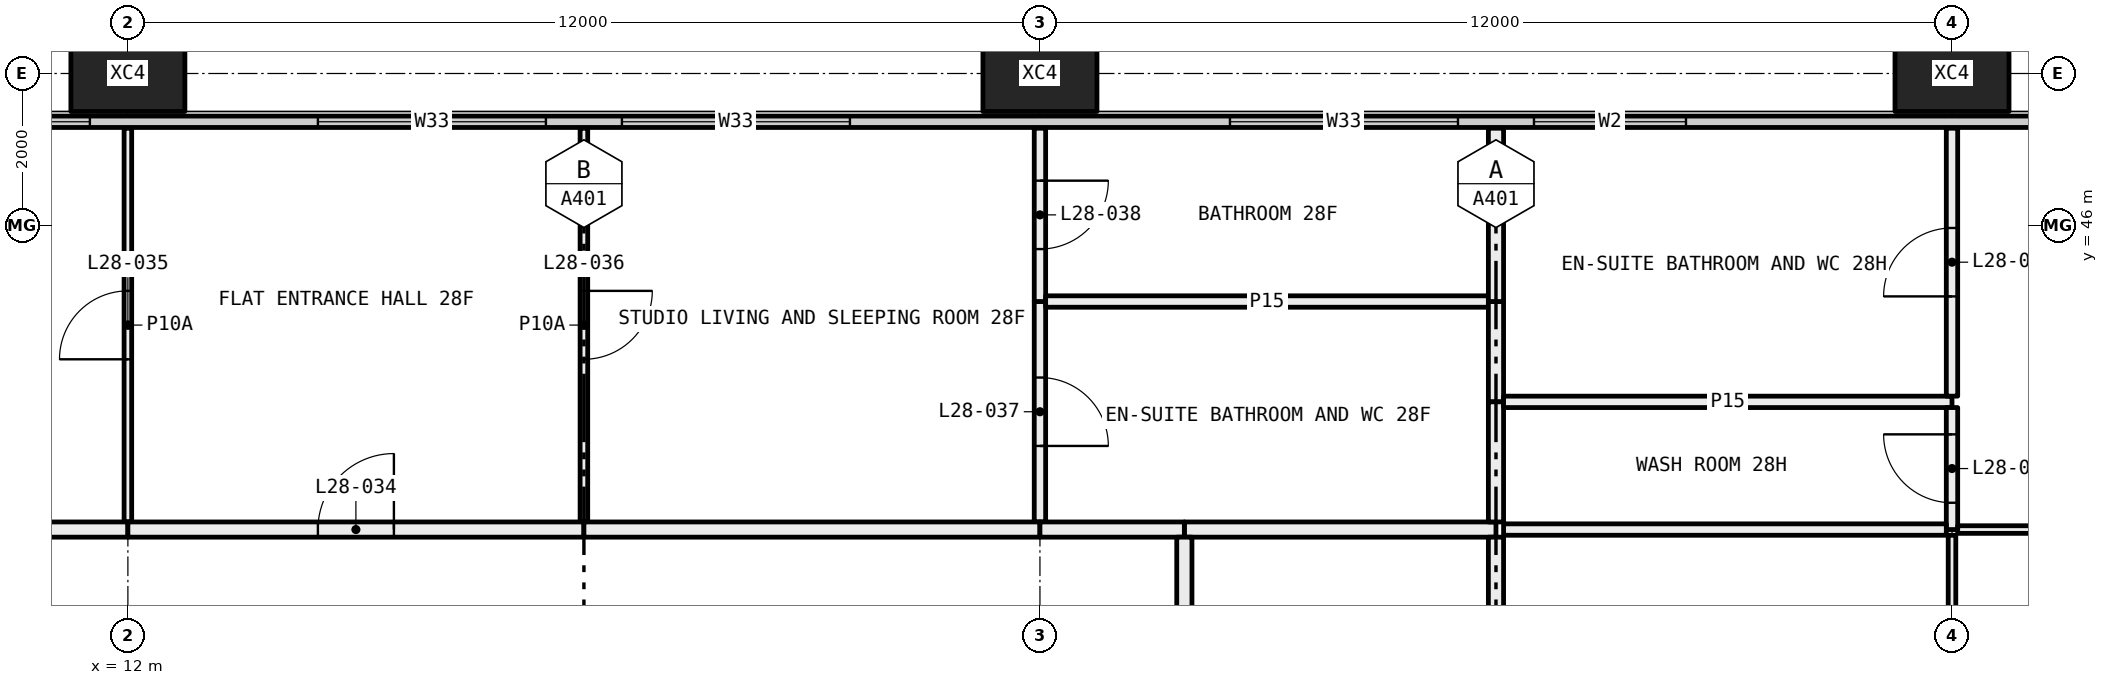
"""IFC4 building model, lengths in metres.
Left out: names, types, materials, properties, quantities, classifications, styles, units other than length and angle.
Written with IfcOpenShell. Run it as: python <this file> out.ifc"""

import sys

from ifc_helpers import new_model, si_unit, direction, frame, frame_2d, origin, origin_2d, place, context, subcontext, project, spatial, rectangle, hollow_rectangle, extrude, element, fill, save


model = new_model("IFC4")
c1 = context("Model", 3, precision=1e-05, world=origin(), true_north=direction((0.0, 1.0)))
c2 = subcontext(c1, "Body", "Model", "MODEL_VIEW")
j1 = project(units=[si_unit("LENGTHUNIT", "METRE"), si_unit("PLANEANGLEUNIT", "RADIAN")], contexts=[c1])
p1 = place(None, origin())
s1 = spatial("IfcSite", under=j1, at=p1, CompositionType="ELEMENT")
p2 = place(p1, origin())
s2 = spatial("IfcBuilding", under=s1, at=p2, CompositionType="ELEMENT")
p3 = place(p2, frame((0.0, 0.0, 110.4)))
s3 = spatial("IfcBuildingStorey", under=s2, at=p3, CompositionType="ELEMENT", Elevation=110.4)
for number, where, z_axis, x_axis in (
    (1, (12.0, 48.0, -0.4), (0.0, 0.0, 1.0), (1.0, 0.0, 0.0)),
    (2, (24.0, 48.0, -0.4), (0.0, 0.0, 1.0), (1.0, 0.0, 0.0)),
    (3, (36.0, 48.0, -0.4), (0.0, 0.0, 1.0), (1.0, 0.0, 0.0)),
):
    element("IfcColumn", number, at=place(p3, frame(where, z_axis=z_axis, x_axis=x_axis)), inside=s3, PredefinedType="COLUMN", context=c2, shape_type="SweptSolid", body=[
        extrude(hollow_rectangle(XDim=1.5, YDim=1.0, WallThickness=0.06, at=origin_2d()), origin(), (0.0, 0.0, 1.0), 3.45),
    ])
p4 = place(p3, frame((6.56, 47.365, 0.0), z_axis=(0.0, 0.0, 1.0), x_axis=(1.0, 0.0, 0.0)))
e4 = element("IfcWall", 4, at=p4, inside=s3, PredefinedType="ELEMENTEDWALL", context=c2, shape_type="SweptSolid", body=[
    extrude(rectangle(XDim=58.88, YDim=0.15, at=frame_2d((29.44, 0.0))), origin(), (0.0, 0.0, 1.0), 3.05),
])
p5 = place(p4, frame((0.44, 0.0, 0.45)))
e5 = element("IfcOpeningElement", 5, at=p5, cuts=e4, PredefinedType="OPENING", context=c2, shape_type="SweptSolid", body=[
    extrude(rectangle(XDim=4.5, YDim=2.55, at=frame_2d((2.25, 1.275))), frame((0.0, 0.085, 0.0), z_axis=(0.0, -1.0, 0.0), x_axis=(1.0, 0.0, 0.0)), (0.0, 0.0, 1.0), 0.17),
])
p6 = place(p4, frame((7.94, 0.0, 0.45)))
e6 = element("IfcOpeningElement", 6, at=p6, cuts=e4, PredefinedType="OPENING", context=c2, shape_type="SweptSolid", body=[
    extrude(rectangle(XDim=3.0, YDim=2.55, at=frame_2d((1.5, 1.275))), frame((0.0, 0.085, 0.0), z_axis=(0.0, -1.0, 0.0), x_axis=(1.0, 0.0, 0.0)), (0.0, 0.0, 1.0), 0.17),
])
p7 = place(p4, frame((11.94, 0.0, 0.45)))
e7 = element("IfcOpeningElement", 7, at=p7, cuts=e4, PredefinedType="OPENING", context=c2, shape_type="SweptSolid", body=[
    extrude(rectangle(XDim=3.0, YDim=2.55, at=frame_2d((1.5, 1.275))), frame((0.0, 0.085, 0.0), z_axis=(0.0, -1.0, 0.0), x_axis=(1.0, 0.0, 0.0)), (0.0, 0.0, 1.0), 0.17),
])
p8 = place(p4, frame((19.94, 0.0, 0.45)))
e8 = element("IfcOpeningElement", 8, at=p8, cuts=e4, PredefinedType="OPENING", context=c2, shape_type="SweptSolid", body=[
    extrude(rectangle(XDim=3.0, YDim=2.55, at=frame_2d((1.5, 1.275))), frame((0.0, 0.085, 0.0), z_axis=(0.0, -1.0, 0.0), x_axis=(1.0, 0.0, 0.0)), (0.0, 0.0, 1.0), 0.17),
])
p9 = place(p4, frame((23.94, 0.0, 0.45)))
e9 = element("IfcOpeningElement", 9, at=p9, cuts=e4, PredefinedType="OPENING", context=c2, shape_type="SweptSolid", body=[
    extrude(rectangle(XDim=2.0, YDim=2.55, at=frame_2d((1.0, 1.275))), frame((0.0, 0.085, 0.0), z_axis=(0.0, -1.0, 0.0), x_axis=(1.0, 0.0, 0.0)), (0.0, 0.0, 1.0), 0.17),
])
p10 = place(p4, frame((31.94, 0.0, 0.45)))
e10 = element("IfcOpeningElement", 10, at=p10, cuts=e4, PredefinedType="OPENING", context=c2, shape_type="SweptSolid", body=[
    extrude(rectangle(XDim=3.0, YDim=2.55, at=frame_2d((1.5, 1.275))), frame((0.0, 0.085, 0.0), z_axis=(0.0, -1.0, 0.0), x_axis=(1.0, 0.0, 0.0)), (0.0, 0.0, 1.0), 0.17),
])
p11 = place(p4, frame((35.94, 0.0, 0.45)))
e11 = element("IfcOpeningElement", 11, at=p11, cuts=e4, PredefinedType="OPENING", context=c2, shape_type="SweptSolid", body=[
    extrude(rectangle(XDim=3.0, YDim=2.55, at=frame_2d((1.5, 1.275))), frame((0.0, 0.085, 0.0), z_axis=(0.0, -1.0, 0.0), x_axis=(1.0, 0.0, 0.0)), (0.0, 0.0, 1.0), 0.17),
])
p12 = place(p4, frame((43.94, 0.0, 0.45)))
e12 = element("IfcOpeningElement", 12, at=p12, cuts=e4, PredefinedType="OPENING", context=c2, shape_type="SweptSolid", body=[
    extrude(rectangle(XDim=3.0, YDim=2.55, at=frame_2d((1.5, 1.275))), frame((0.0, 0.085, 0.0), z_axis=(0.0, -1.0, 0.0), x_axis=(1.0, 0.0, 0.0)), (0.0, 0.0, 1.0), 0.17),
])
p13 = place(p4, frame((47.94, 0.0, 0.45)))
e13 = element("IfcOpeningElement", 13, at=p13, cuts=e4, PredefinedType="OPENING", context=c2, shape_type="SweptSolid", body=[
    extrude(rectangle(XDim=2.0, YDim=2.55, at=frame_2d((1.0, 1.275))), frame((0.0, 0.085, 0.0), z_axis=(0.0, -1.0, 0.0), x_axis=(1.0, 0.0, 0.0)), (0.0, 0.0, 1.0), 0.17),
])
p14 = place(p4, frame((53.94, 0.0, 0.45)))
e14 = element("IfcOpeningElement", 14, at=p14, cuts=e4, PredefinedType="OPENING", context=c2, shape_type="SweptSolid", body=[
    extrude(rectangle(XDim=4.5, YDim=2.55, at=frame_2d((2.25, 1.275))), frame((0.0, 0.085, 0.0), z_axis=(0.0, -1.0, 0.0), x_axis=(1.0, 0.0, 0.0)), (0.0, 0.0, 1.0), 0.17),
])
p15 = place(p3, frame((12.0, 42.1, 0.0), z_axis=(0.0, 0.0, 1.0), x_axis=(0.0, 1.0, 0.0)))
e15 = element("IfcWall", 15, at=p15, inside=s3, PredefinedType="PARTITIONING", context=c2, shape_type="SweptSolid", body=[
    extrude(rectangle(XDim=5.18, YDim=0.1, at=frame_2d((2.59, 0.0))), origin(), (0.0, 0.0, 1.0), 3.05),
])
p16 = place(p15, frame((2.14, 0.0, 0.0)))
e16 = element("IfcOpeningElement", 16, at=p16, cuts=e15, PredefinedType="OPENING", context=c2, shape_type="SweptSolid", body=[
    extrude(rectangle(XDim=0.9, YDim=2.1, at=frame_2d((0.45, 1.05))), frame((0.0, 0.06, 0.0), z_axis=(0.0, -1.0, 0.0), x_axis=(1.0, 0.0, 0.0)), (0.0, 0.0, 1.0), 0.12),
])
p17 = place(p3, frame((10.2, 42.0, 0.0), z_axis=(0.0, 0.0, 1.0), x_axis=(1.0, 0.0, 0.0)))
e17 = element("IfcWall", 17, at=p17, inside=s3, PredefinedType="PARTITIONING", context=c2, shape_type="SweptSolid", body=[
    extrude(rectangle(XDim=1.8, YDim=0.2, at=frame_2d((0.9, 0.0))), origin(), (0.0, 0.0, 1.0), 3.05),
])
p18 = place(p3, frame((18.0, 42.1, 0.0), z_axis=(0.0, 0.0, 1.0), x_axis=(0.0, 1.0, 0.0)))
e18 = element("IfcWall", 18, at=p18, inside=s3, PredefinedType="PARTITIONING", context=c2, shape_type="SweptSolid", body=[
    extrude(rectangle(XDim=5.18, YDim=0.1, at=frame_2d((2.59, 0.0))), origin(), (0.0, 0.0, 1.0), 3.05),
])
p19 = place(p18, frame((2.14, 0.0, 0.0)))
e19 = element("IfcOpeningElement", 19, at=p19, cuts=e18, PredefinedType="OPENING", context=c2, shape_type="SweptSolid", body=[
    extrude(rectangle(XDim=0.9, YDim=2.1, at=frame_2d((0.45, 1.05))), frame((0.0, 0.06, 0.0), z_axis=(0.0, -1.0, 0.0), x_axis=(1.0, 0.0, 0.0)), (0.0, 0.0, 1.0), 0.12),
])
p20 = place(p3, frame((12.0, 42.0, 0.0), z_axis=(0.0, 0.0, 1.0), x_axis=(1.0, 0.0, 0.0)))
e20 = element("IfcWall", 20, at=p20, inside=s3, PredefinedType="PARTITIONING", context=c2, shape_type="SweptSolid", body=[
    extrude(rectangle(XDim=6.0, YDim=0.2, at=frame_2d((3.0, 0.0))), origin(), (0.0, 0.0, 1.0), 3.05),
])
p21 = place(p20, frame((2.5, 0.0, 0.0)))
e21 = element("IfcOpeningElement", 21, at=p21, cuts=e20, PredefinedType="OPENING", context=c2, shape_type="SweptSolid", body=[
    extrude(rectangle(XDim=1.0, YDim=2.1, at=frame_2d((0.5, 1.05))), frame((0.0, 0.11, 0.0), z_axis=(0.0, -1.0, 0.0), x_axis=(1.0, 0.0, 0.0)), (0.0, 0.0, 1.0), 0.22),
])
p22 = place(p3, frame((24.0, 42.1, 0.0), z_axis=(0.0, 0.0, 1.0), x_axis=(0.0, 1.0, 0.0)))
e22 = element("IfcWall", 22, at=p22, inside=s3, PredefinedType="PARTITIONING", context=c2, shape_type="SweptSolid", body=[
    extrude(rectangle(XDim=2.9, YDim=0.15, at=frame_2d((1.45, 0.0))), origin(), (0.0, 0.0, 1.0), 3.05),
])
p23 = place(p22, frame((1.0, 0.0, 0.0)))
e23 = element("IfcOpeningElement", 23, at=p23, cuts=e22, PredefinedType="OPENING", context=c2, shape_type="SweptSolid", body=[
    extrude(rectangle(XDim=0.9, YDim=2.1, at=frame_2d((0.45, 1.05))), frame((0.0, 0.085, 0.0), z_axis=(0.0, -1.0, 0.0), x_axis=(1.0, 0.0, 0.0)), (0.0, 0.0, 1.0), 0.17),
])
p24 = place(p3, frame((24.0, 45.0, 0.0), z_axis=(0.0, 0.0, 1.0), x_axis=(0.0, 1.0, 0.0)))
e24 = element("IfcWall", 24, at=p24, inside=s3, PredefinedType="PARTITIONING", context=c2, shape_type="SweptSolid", body=[
    extrude(rectangle(XDim=2.28, YDim=0.15, at=frame_2d((1.14, 0.0))), origin(), (0.0, 0.0, 1.0), 3.05),
])
p25 = place(p24, frame((0.69, 0.0, 0.0)))
e25 = element("IfcOpeningElement", 25, at=p25, cuts=e24, PredefinedType="OPENING", context=c2, shape_type="SweptSolid", body=[
    extrude(rectangle(XDim=0.9, YDim=2.1, at=frame_2d((0.45, 1.05))), frame((0.0, 0.085, 0.0), z_axis=(0.0, -1.0, 0.0), x_axis=(1.0, 0.0, 0.0)), (0.0, 0.0, 1.0), 0.17),
])
p26 = place(p3, frame((18.0, 42.0, 0.0), z_axis=(0.0, 0.0, 1.0), x_axis=(1.0, 0.0, 0.0)))
e26 = element("IfcWall", 26, at=p26, inside=s3, PredefinedType="PARTITIONING", context=c2, shape_type="SweptSolid", body=[
    extrude(rectangle(XDim=6.0, YDim=0.2, at=frame_2d((3.0, 0.0))), origin(), (0.0, 0.0, 1.0), 3.05),
])
p27 = place(p3, frame((29.9, 45.0, 0.0), z_axis=(0.0, 0.0, 1.0), x_axis=(-1.0, 0.0, 0.0)))
e27 = element("IfcWall", 27, at=p27, inside=s3, PredefinedType="PARTITIONING", context=c2, shape_type="SweptSolid", body=[
    extrude(rectangle(XDim=5.825, YDim=0.15, at=frame_2d((2.913, 0.0))), origin(), (0.0, 0.0, 1.0), 3.05),
])
p28 = place(p3, frame((25.9, 42.0, 0.0), z_axis=(0.0, 0.0, 1.0), x_axis=(1.0, 0.0, 0.0)))
e28 = element("IfcWall", 28, at=p28, inside=s3, PredefinedType="PARTITIONING", context=c2, shape_type="SweptSolid", body=[
    extrude(rectangle(XDim=4.1, YDim=0.2, at=frame_2d((2.05, 0.0))), origin(), (0.0, 0.0, 1.0), 3.05),
])
p29 = place(p3, frame((30.0, 43.68, 0.0), z_axis=(0.0, 0.0, 1.0), x_axis=(0.0, 1.0, 0.0)))
e29 = element("IfcWall", 29, at=p29, inside=s3, PredefinedType="PARTITIONING", context=c2, shape_type="SweptSolid", body=[
    extrude(rectangle(XDim=1.32, YDim=0.2, at=frame_2d((0.66, 0.0))), origin(), (0.0, 0.0, 1.0), 3.05),
])
p30 = place(p3, frame((30.0, 42.1, 0.0), z_axis=(0.0, 0.0, 1.0), x_axis=(0.0, 1.0, 0.0)))
e30 = element("IfcWall", 30, at=p30, inside=s3, PredefinedType="PARTITIONING", context=c2, shape_type="SweptSolid", body=[
    extrude(rectangle(XDim=1.58, YDim=0.2, at=frame_2d((0.79, 0.0))), origin(), (0.0, 0.0, 1.0), 3.05),
])
p31 = place(p3, frame((24.0, 42.0, 0.0), z_axis=(0.0, 0.0, 1.0), x_axis=(1.0, 0.0, 0.0)))
e31 = element("IfcWall", 31, at=p31, inside=s3, PredefinedType="PARTITIONING", context=c2, shape_type="SweptSolid", body=[
    extrude(rectangle(XDim=1.9, YDim=0.2, at=frame_2d((0.95, 0.0))), origin(), (0.0, 0.0, 1.0), 3.05),
])
p32 = place(p3, frame((30.0, 45.0, 0.0), z_axis=(0.0, 0.0, 1.0), x_axis=(0.0, 1.0, 0.0)))
e32 = element("IfcWall", 32, at=p32, inside=s3, PredefinedType="PARTITIONING", context=c2, shape_type="SweptSolid", body=[
    extrude(rectangle(XDim=2.28, YDim=0.2, at=frame_2d((1.14, 0.0))), origin(), (0.0, 0.0, 1.0), 3.05),
])
p33 = place(p3, frame((30.0, 36.1, 0.0), z_axis=(0.0, 0.0, 1.0), x_axis=(0.0, 1.0, 0.0)))
e33 = element("IfcWall", 33, at=p33, inside=s3, PredefinedType="PARTITIONING", context=c2, shape_type="SweptSolid", body=[
    extrude(rectangle(XDim=5.8, YDim=0.2, at=frame_2d((2.9, 0.0))), origin(), (0.0, 0.0, 1.0), 3.05),
])
p34 = place(p3, frame((25.9, 41.9, 0.0), z_axis=(0.0, 0.0, 1.0), x_axis=(0.0, -1.0, 0.0)))
e34 = element("IfcWall", 34, at=p34, inside=s3, PredefinedType="PARTITIONING", context=c2, shape_type="SweptSolid", body=[
    extrude(rectangle(XDim=6.0, YDim=0.2, at=frame_2d((3.0, 0.0))), origin(), (0.0, 0.0, 1.0), 2.45),
])
p35 = place(p34, frame((2.55, 0.0, 0.0)))
e35 = element("IfcOpeningElement", 35, at=p35, cuts=e34, PredefinedType="OPENING", context=c2, shape_type="SweptSolid", body=[
    extrude(rectangle(XDim=0.9, YDim=2.1, at=frame_2d((0.45, 1.05))), frame((0.0, 0.11, 0.0), z_axis=(0.0, -1.0, 0.0), x_axis=(1.0, 0.0, 0.0)), (0.0, 0.0, 1.0), 0.22),
])
p36 = place(p3, frame((30.1, 43.68, 0.0), z_axis=(0.0, 0.0, 1.0), x_axis=(1.0, 0.0, 0.0)))
e36 = element("IfcWall", 36, at=p36, inside=s3, PredefinedType="PARTITIONING", context=c2, shape_type="SweptSolid", body=[
    extrude(rectangle(XDim=5.9, YDim=0.15, at=frame_2d((2.95, 0.0))), origin(), (0.0, 0.0, 1.0), 2.45),
])
p37 = place(p3, frame((36.0, 43.755, 0.0), z_axis=(0.0, 0.0, 1.0), x_axis=(0.0, 1.0, 0.0)))
e37 = element("IfcWall", 37, at=p37, inside=s3, PredefinedType="PARTITIONING", context=c2, shape_type="SweptSolid", body=[
    extrude(rectangle(XDim=3.525, YDim=0.15, at=frame_2d((1.763, 0.0))), origin(), (0.0, 0.0, 1.0), 2.45),
])
p38 = place(p37, frame((1.312, 0.0, 0.0)))
e38 = element("IfcOpeningElement", 38, at=p38, cuts=e37, PredefinedType="OPENING", context=c2, shape_type="SweptSolid", body=[
    extrude(rectangle(XDim=0.9, YDim=2.1, at=frame_2d((0.45, 1.05))), frame((0.0, 0.085, 0.0), z_axis=(0.0, -1.0, 0.0), x_axis=(1.0, 0.0, 0.0)), (0.0, 0.0, 1.0), 0.17),
])
p39 = place(p3, frame((36.0, 42.0, 0.0), z_axis=(0.0, 0.0, 1.0), x_axis=(0.0, 1.0, 0.0)))
e39 = element("IfcWall", 39, at=p39, inside=s3, PredefinedType="PARTITIONING", context=c2, shape_type="SweptSolid", body=[
    extrude(rectangle(XDim=1.605, YDim=0.15, at=frame_2d((0.802, 0.0))), origin(), (0.0, 0.0, 1.0), 2.45),
])
p40 = place(p39, frame((0.353, 0.0, 0.0)))
e40 = element("IfcOpeningElement", 40, at=p40, cuts=e39, PredefinedType="OPENING", context=c2, shape_type="SweptSolid", body=[
    extrude(rectangle(XDim=0.9, YDim=2.1, at=frame_2d((0.45, 1.05))), frame((0.0, 0.085, 0.0), z_axis=(0.0, -1.0, 0.0), x_axis=(1.0, 0.0, 0.0)), (0.0, 0.0, 1.0), 0.17),
])
p41 = place(p3, frame((30.1, 42.0, 0.0), z_axis=(0.0, 0.0, 1.0), x_axis=(1.0, 0.0, 0.0)))
e41 = element("IfcWall", 41, at=p41, inside=s3, PredefinedType="PARTITIONING", context=c2, shape_type="SweptSolid", body=[
    extrude(rectangle(XDim=5.825, YDim=0.15, at=frame_2d((2.913, 0.0))), origin(), (0.0, 0.0, 1.0), 2.45),
])
p42 = place(p3, frame((36.075, 42.0, 0.0), z_axis=(0.0, 0.0, 1.0), x_axis=(1.0, 0.0, 0.0)))
e42 = element("IfcWall", 42, at=p42, inside=s3, PredefinedType="PARTITIONING", context=c2, shape_type="SweptSolid", body=[
    extrude(rectangle(XDim=4.425, YDim=0.1, at=frame_2d((2.212, 0.0))), origin(), (0.0, 0.0, 1.0), 2.45),
])
p43 = place(p42, frame((1.762, 0.0, 0.0)))
e43 = element("IfcOpeningElement", 43, at=p43, cuts=e42, PredefinedType="OPENING", context=c2, shape_type="SweptSolid", body=[
    extrude(rectangle(XDim=0.9, YDim=2.1, at=frame_2d((0.45, 1.05))), frame((0.0, 0.06, 0.0), z_axis=(0.0, -1.0, 0.0), x_axis=(1.0, 0.0, 0.0)), (0.0, 0.0, 1.0), 0.12),
])
p44 = place(p3, frame((36.0, 36.75, 0.0), z_axis=(0.0, 0.0, 1.0), x_axis=(0.0, 1.0, 0.0)))
e44 = element("IfcWall", 44, at=p44, inside=s3, PredefinedType="PARTITIONING", context=c2, shape_type="SweptSolid", body=[
    extrude(rectangle(XDim=5.175, YDim=0.1, at=frame_2d((2.587, 0.0))), origin(), (0.0, 0.0, 1.0), 2.45),
])
p45 = place(p44, frame((2.137, 0.0, 0.0)))
e45 = element("IfcOpeningElement", 45, at=p45, cuts=e44, PredefinedType="OPENING", context=c2, shape_type="SweptSolid", body=[
    extrude(rectangle(XDim=0.9, YDim=2.1, at=frame_2d((0.45, 1.05))), frame((0.0, 0.06, 0.0), z_axis=(0.0, -1.0, 0.0), x_axis=(1.0, 0.0, 0.0)), (0.0, 0.0, 1.0), 0.12),
])
p46 = place(p5, origin())
e46 = element("IfcWindow", 46, at=p46, inside=s3, PartitioningType="SINGLE_PANEL", PredefinedType="WINDOW", context=c2, shape_type="SweptSolid", body=[
    extrude(rectangle(XDim=4.5, YDim=2.55, at=frame_2d((2.25, 1.275))), frame((0.0, 0.03, 0.0), z_axis=(0.0, -1.0, 0.0), x_axis=(1.0, 0.0, 0.0)), (0.0, 0.0, 1.0), 0.06),
])
fill(e5, e46)
p47 = place(p6, origin())
e47 = element("IfcWindow", 47, at=p47, inside=s3, PartitioningType="SINGLE_PANEL", PredefinedType="WINDOW", context=c2, shape_type="SweptSolid", body=[
    extrude(rectangle(XDim=3.0, YDim=2.55, at=frame_2d((1.5, 1.275))), frame((0.0, 0.03, 0.0), z_axis=(0.0, -1.0, 0.0), x_axis=(1.0, 0.0, 0.0)), (0.0, 0.0, 1.0), 0.06),
])
fill(e6, e47)
p48 = place(p7, origin())
e48 = element("IfcWindow", 48, at=p48, inside=s3, PartitioningType="SINGLE_PANEL", PredefinedType="WINDOW", context=c2, shape_type="SweptSolid", body=[
    extrude(rectangle(XDim=3.0, YDim=2.55, at=frame_2d((1.5, 1.275))), frame((0.0, 0.03, 0.0), z_axis=(0.0, -1.0, 0.0), x_axis=(1.0, 0.0, 0.0)), (0.0, 0.0, 1.0), 0.06),
])
fill(e7, e48)
p49 = place(p8, origin())
e49 = element("IfcWindow", 49, at=p49, inside=s3, PartitioningType="SINGLE_PANEL", PredefinedType="WINDOW", context=c2, shape_type="SweptSolid", body=[
    extrude(rectangle(XDim=3.0, YDim=2.55, at=frame_2d((1.5, 1.275))), frame((0.0, 0.03, 0.0), z_axis=(0.0, -1.0, 0.0), x_axis=(1.0, 0.0, 0.0)), (0.0, 0.0, 1.0), 0.06),
])
fill(e8, e49)
p50 = place(p9, origin())
e50 = element("IfcWindow", 50, at=p50, inside=s3, PartitioningType="SINGLE_PANEL", PredefinedType="WINDOW", context=c2, shape_type="SweptSolid", body=[
    extrude(rectangle(XDim=2.0, YDim=2.55, at=frame_2d((1.0, 1.275))), frame((0.0, 0.03, 0.0), z_axis=(0.0, -1.0, 0.0), x_axis=(1.0, 0.0, 0.0)), (0.0, 0.0, 1.0), 0.06),
])
fill(e9, e50)
p51 = place(p21, origin())
e51 = element("IfcDoor", 51, at=p51, inside=s3, OperationType="SINGLE_SWING_LEFT", PredefinedType="DOOR", context=c2, shape_type="SweptSolid", body=[
    extrude(rectangle(XDim=1.0, YDim=2.1, at=frame_2d((0.5, 1.05))), frame((0.0, 0.025, 0.0), z_axis=(0.0, -1.0, 0.0), x_axis=(1.0, 0.0, 0.0)), (0.0, 0.0, 1.0), 0.05),
])
fill(e21, e51)
p52 = place(p16, origin())
e52 = element("IfcDoor", 52, at=p52, inside=s3, OperationType="SINGLE_SWING_RIGHT", PredefinedType="DOOR", context=c2, shape_type="SweptSolid", body=[
    extrude(rectangle(XDim=0.9, YDim=2.1, at=frame_2d((0.45, 1.05))), frame((0.0, 0.025, 0.0), z_axis=(0.0, -1.0, 0.0), x_axis=(1.0, 0.0, 0.0)), (0.0, 0.0, 1.0), 0.05),
])
fill(e16, e52)
p53 = place(p19, frame((0.9, 0.0, 0.0), x_axis=(-1.0, 0.0, 0.0)))
e53 = element("IfcDoor", 53, at=p53, inside=s3, OperationType="SINGLE_SWING_RIGHT", PredefinedType="DOOR", context=c2, shape_type="SweptSolid", body=[
    extrude(rectangle(XDim=0.9, YDim=2.1, at=frame_2d((0.45, 1.05))), frame((0.0, 0.025, 0.0), z_axis=(0.0, -1.0, 0.0), x_axis=(1.0, 0.0, 0.0)), (0.0, 0.0, 1.0), 0.05),
])
fill(e19, e53)
p54 = place(p23, frame((0.9, 0.0, 0.0), x_axis=(-1.0, 0.0, 0.0)))
e54 = element("IfcDoor", 54, at=p54, inside=s3, OperationType="SINGLE_SWING_LEFT", PredefinedType="DOOR", context=c2, shape_type="SweptSolid", body=[
    extrude(rectangle(XDim=0.9, YDim=2.1, at=frame_2d((0.45, 1.05))), frame((0.0, 0.025, 0.0), z_axis=(0.0, -1.0, 0.0), x_axis=(1.0, 0.0, 0.0)), (0.0, 0.0, 1.0), 0.05),
])
fill(e23, e54)
p55 = place(p25, frame((0.9, 0.0, 0.0), x_axis=(-1.0, 0.0, 0.0)))
e55 = element("IfcDoor", 55, at=p55, inside=s3, OperationType="SINGLE_SWING_RIGHT", PredefinedType="DOOR", context=c2, shape_type="SweptSolid", body=[
    extrude(rectangle(XDim=0.9, YDim=2.1, at=frame_2d((0.45, 1.05))), frame((0.0, 0.025, 0.0), z_axis=(0.0, -1.0, 0.0), x_axis=(1.0, 0.0, 0.0)), (0.0, 0.0, 1.0), 0.05),
])
fill(e25, e55)
p56 = place(p38, origin())
e56 = element("IfcDoor", 56, at=p56, inside=s3, OperationType="SINGLE_SWING_RIGHT", PredefinedType="DOOR", context=c2, shape_type="SweptSolid", body=[
    extrude(rectangle(XDim=0.9, YDim=2.1, at=frame_2d((0.45, 1.05))), frame((0.0, 0.025, 0.0), z_axis=(0.0, -1.0, 0.0), x_axis=(1.0, 0.0, 0.0)), (0.0, 0.0, 1.0), 0.05),
])
fill(e38, e56)
p57 = place(p40, origin())
e57 = element("IfcDoor", 57, at=p57, inside=s3, OperationType="SINGLE_SWING_LEFT", PredefinedType="DOOR", context=c2, shape_type="SweptSolid", body=[
    extrude(rectangle(XDim=0.9, YDim=2.1, at=frame_2d((0.45, 1.05))), frame((0.0, 0.025, 0.0), z_axis=(0.0, -1.0, 0.0), x_axis=(1.0, 0.0, 0.0)), (0.0, 0.0, 1.0), 0.05),
])
fill(e40, e57)
save(model, sys.argv[1])
